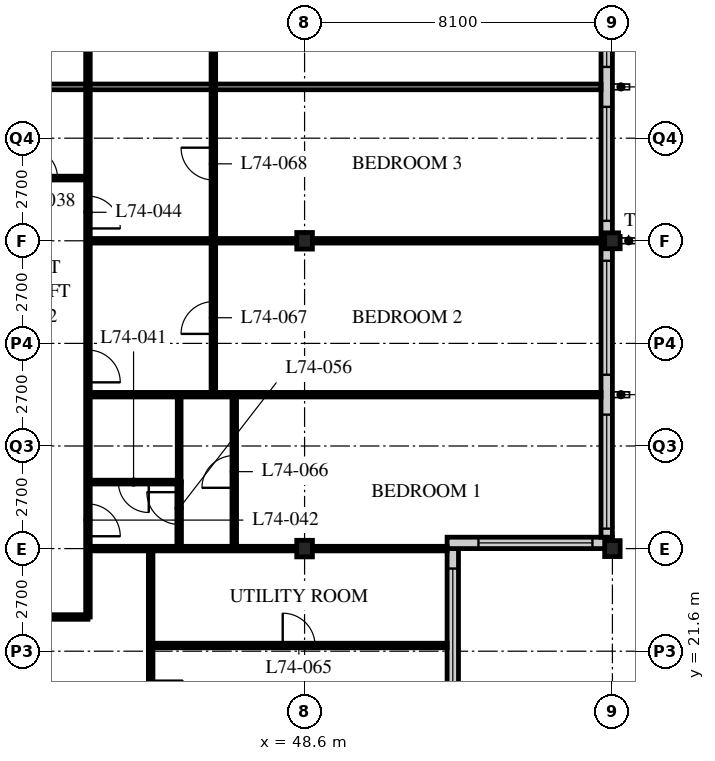
"""IFC4 building model, lengths in metres.
Left out: names, types, materials, properties, quantities, classifications, styles, units other than length and angle.
Written with IfcOpenShell. Run it as: python <this file> out.ifc"""

import sys

from ifc_helpers import new_model, si_unit, direction, frame, frame_2d, origin, origin_2d, place, context, subcontext, project, spatial, rectangle, i_section, extrude, element, fill, save


model = new_model("IFC4")
c1 = context("Model", 3, precision=1e-05, world=origin(), true_north=direction((0.0, 1.0)))
c2 = subcontext(c1, "Body", "Model", "MODEL_VIEW")
j1 = project(units=[si_unit("LENGTHUNIT", "METRE"), si_unit("PLANEANGLEUNIT", "RADIAN")], contexts=[c1])
p1 = place(None, origin())
s1 = spatial("IfcSite", under=j1, at=p1, CompositionType="ELEMENT")
p2 = place(p1, origin())
s2 = spatial("IfcBuilding", under=s1, at=p2, CompositionType="ELEMENT")
p3 = place(p2, frame((0.0, 0.0, 289.2)))
s3 = spatial("IfcBuildingStorey", under=s2, at=p3, CompositionType="ELEMENT", Elevation=289.2)
for number, where, z_axis, x_axis in (
    (1, (48.6, 24.3, 0.0), (0.0, 0.0, 1.0), (1.0, 0.0, 0.0)),
    (2, (48.6, 32.4, 0.0), (0.0, 0.0, 1.0), (1.0, 0.0, 0.0)),
):
    element("IfcColumn", number, at=place(p3, frame(where, z_axis=z_axis, x_axis=x_axis)), inside=s3, PredefinedType="COLUMN", context=c2, shape_type="SweptSolid", body=[
        extrude(i_section(OverallWidth=0.412, OverallDepth=0.437, WebThickness=0.036, FlangeThickness=0.058, FilletRadius=0.015, at=origin_2d()), origin(), (0.0, 0.0, 1.0), 3.9),
    ])
for number, where, z_axis, x_axis in (
    (3, (56.7, 24.3, 0.0), (0.0, 0.0, 1.0), (1.0, 0.0, 0.0)),
    (4, (56.7, 32.4, 0.0), (0.0, 0.0, 1.0), (1.0, 0.0, 0.0)),
):
    element("IfcColumn", number, at=place(p3, frame(where, z_axis=z_axis, x_axis=x_axis)), inside=s3, PredefinedType="COLUMN", context=c2, shape_type="SweptSolid", body=[
        extrude(i_section(OverallWidth=0.407, OverallDepth=0.419, WebThickness=0.031, FlangeThickness=0.049, FilletRadius=0.015, at=origin_2d()), origin(), (0.0, 0.0, 1.0), 3.9),
    ])
p4 = place(p3, frame((52.5, 20.55, 0.0), z_axis=(0.0, 0.0, 1.0), x_axis=(0.0, 1.0, 0.0)))
e5 = element("IfcWall", 5, at=p4, inside=s3, PredefinedType="SOLIDWALL", context=c2, shape_type="SweptSolid", body=[
    extrude(rectangle(XDim=3.75, YDim=0.3, at=frame_2d((1.875, 0.0))), origin(), (0.0, 0.0, 1.0), 3.69),
])
p5 = place(p4, frame((0.225, 0.0, 0.6)))
e6 = element("IfcOpeningElement", 6, at=p5, cuts=e5, PredefinedType="OPENING", context=c2, shape_type="SweptSolid", body=[
    extrude(rectangle(XDim=3.0, YDim=2.3, at=frame_2d((1.5, 1.15))), frame((0.0, 0.16, 0.0), z_axis=(0.0, -1.0, 0.0), x_axis=(1.0, 0.0, 0.0)), (0.0, 0.0, 1.0), 0.32),
])
p6 = place(p3, frame((52.35, 24.45, 0.0), z_axis=(0.0, 0.0, 1.0), x_axis=(1.0, 0.0, 0.0)))
e7 = element("IfcWall", 7, at=p6, inside=s3, PredefinedType="SOLIDWALL", context=c2, shape_type="SweptSolid", body=[
    extrude(rectangle(XDim=4.35, YDim=0.3, at=frame_2d((2.175, 0.0))), origin(), (0.0, 0.0, 1.0), 3.69),
])
p7 = place(p6, frame((0.825, 0.0, 0.6)))
e8 = element("IfcOpeningElement", 8, at=p7, cuts=e7, PredefinedType="OPENING", context=c2, shape_type="SweptSolid", body=[
    extrude(rectangle(XDim=3.0, YDim=2.3, at=frame_2d((1.5, 1.15))), frame((0.0, 0.16, 0.0), z_axis=(0.0, -1.0, 0.0), x_axis=(1.0, 0.0, 0.0)), (0.0, 0.0, 1.0), 0.32),
])
p8 = place(p3, frame((56.55, 24.6, 0.0), z_axis=(0.0, 0.0, 1.0), x_axis=(0.0, 1.0, 0.0)))
e9 = element("IfcWall", 9, at=p8, inside=s3, PredefinedType="SOLIDWALL", context=c2, shape_type="SweptSolid", body=[
    extrude(rectangle(XDim=32.1, YDim=0.3, at=frame_2d((16.05, 0.0))), origin(), (0.0, 0.0, 1.0), 3.69),
])
p9 = place(p8, frame((0.225, 0.0, 0.6)))
e10 = element("IfcOpeningElement", 10, at=p9, cuts=e9, PredefinedType="OPENING", context=c2, shape_type="SweptSolid", body=[
    extrude(rectangle(XDim=3.0, YDim=2.4, at=frame_2d((1.5, 1.2))), frame((0.0, 0.16, 0.0), z_axis=(0.0, -1.0, 0.0), x_axis=(1.0, 0.0, 0.0)), (0.0, 0.0, 1.0), 0.32),
])
p10 = place(p8, frame((4.275, 0.0, 0.6)))
e11 = element("IfcOpeningElement", 11, at=p10, cuts=e9, PredefinedType="OPENING", context=c2, shape_type="SweptSolid", body=[
    extrude(rectangle(XDim=3.0, YDim=2.4, at=frame_2d((1.5, 1.2))), frame((0.0, 0.16, 0.0), z_axis=(0.0, -1.0, 0.0), x_axis=(1.0, 0.0, 0.0)), (0.0, 0.0, 1.0), 0.32),
])
p11 = place(p8, frame((8.325, 0.0, 0.6)))
e12 = element("IfcOpeningElement", 12, at=p11, cuts=e9, PredefinedType="OPENING", context=c2, shape_type="SweptSolid", body=[
    extrude(rectangle(XDim=3.0, YDim=2.4, at=frame_2d((1.5, 1.2))), frame((0.0, 0.16, 0.0), z_axis=(0.0, -1.0, 0.0), x_axis=(1.0, 0.0, 0.0)), (0.0, 0.0, 1.0), 0.32),
])
p12 = place(p8, frame((12.375, 0.0, 0.6)))
e13 = element("IfcOpeningElement", 13, at=p12, cuts=e9, PredefinedType="OPENING", context=c2, shape_type="SweptSolid", body=[
    extrude(rectangle(XDim=3.0, YDim=2.4, at=frame_2d((1.5, 1.2))), frame((0.0, 0.16, 0.0), z_axis=(0.0, -1.0, 0.0), x_axis=(1.0, 0.0, 0.0)), (0.0, 0.0, 1.0), 0.32),
])
p13 = place(p8, frame((16.425, 0.0, 0.6)))
e14 = element("IfcOpeningElement", 14, at=p13, cuts=e9, PredefinedType="OPENING", context=c2, shape_type="SweptSolid", body=[
    extrude(rectangle(XDim=3.0, YDim=2.4, at=frame_2d((1.5, 1.2))), frame((0.0, 0.16, 0.0), z_axis=(0.0, -1.0, 0.0), x_axis=(1.0, 0.0, 0.0)), (0.0, 0.0, 1.0), 0.32),
])
p14 = place(p8, frame((20.475, 0.0, 0.6)))
e15 = element("IfcOpeningElement", 15, at=p14, cuts=e9, PredefinedType="OPENING", context=c2, shape_type="SweptSolid", body=[
    extrude(rectangle(XDim=3.0, YDim=2.4, at=frame_2d((1.5, 1.2))), frame((0.0, 0.16, 0.0), z_axis=(0.0, -1.0, 0.0), x_axis=(1.0, 0.0, 0.0)), (0.0, 0.0, 1.0), 0.32),
])
p15 = place(p8, frame((24.525, 0.0, 0.6)))
e16 = element("IfcOpeningElement", 16, at=p15, cuts=e9, PredefinedType="OPENING", context=c2, shape_type="SweptSolid", body=[
    extrude(rectangle(XDim=3.0, YDim=2.4, at=frame_2d((1.5, 1.2))), frame((0.0, 0.16, 0.0), z_axis=(0.0, -1.0, 0.0), x_axis=(1.0, 0.0, 0.0)), (0.0, 0.0, 1.0), 0.32),
])
p16 = place(p8, frame((28.575, 0.0, 0.6)))
e17 = element("IfcOpeningElement", 17, at=p16, cuts=e9, PredefinedType="OPENING", context=c2, shape_type="SweptSolid", body=[
    extrude(rectangle(XDim=3.0, YDim=2.4, at=frame_2d((1.5, 1.2))), frame((0.0, 0.16, 0.0), z_axis=(0.0, -1.0, 0.0), x_axis=(1.0, 0.0, 0.0)), (0.0, 0.0, 1.0), 0.32),
])
p17 = place(p3, frame((40.5, 34.05, 0.0), z_axis=(0.0, 0.0, 1.0), x_axis=(1.0, 0.0, 0.0)))
e18 = element("IfcWall", 18, at=p17, inside=s3, PredefinedType="PARTITIONING", context=c2, shape_type="SweptSolid", body=[
    extrude(rectangle(XDim=2.4, YDim=0.1, at=frame_2d((1.2, 0.0))), origin(), (0.0, 0.0, 1.0), 3.69),
])
p18 = place(p17, frame((0.8, 0.0, 0.0)))
e19 = element("IfcOpeningElement", 19, at=p18, cuts=e18, PredefinedType="OPENING", context=c2, shape_type="SweptSolid", body=[
    extrude(rectangle(XDim=0.8, YDim=2.1, at=frame_2d((0.4, 1.05))), frame((0.0, 0.06, 0.0), z_axis=(0.0, -1.0, 0.0), x_axis=(1.0, 0.0, 0.0)), (0.0, 0.0, 1.0), 0.12),
])
p19 = place(p3, frame((42.9, 22.5, 0.0), z_axis=(0.0, 0.0, 1.0), x_axis=(0.0, 1.0, 0.0)))
e20 = element("IfcWall", 20, at=p19, inside=s3, PredefinedType="PARTITIONING", context=c2, shape_type="SweptSolid", body=[
    extrude(rectangle(XDim=13.95, YDim=0.12, at=frame_2d((6.975, 0.0))), origin(), (0.0, 0.0, 1.0), 3.69),
])
p20 = place(p19, frame((2.125, 0.0, 0.0)))
e21 = element("IfcOpeningElement", 21, at=p20, cuts=e20, PredefinedType="OPENING", context=c2, shape_type="SweptSolid", body=[
    extrude(rectangle(XDim=0.85, YDim=2.1, at=frame_2d((0.425, 1.05))), frame((0.0, 0.07, 0.0), z_axis=(0.0, -1.0, 0.0), x_axis=(1.0, 0.0, 0.0)), (0.0, 0.0, 1.0), 0.14),
])
p21 = place(p19, frame((6.175, 0.0, 0.0)))
e22 = element("IfcOpeningElement", 22, at=p21, cuts=e20, PredefinedType="OPENING", context=c2, shape_type="SweptSolid", body=[
    extrude(rectangle(XDim=0.85, YDim=2.1, at=frame_2d((0.425, 1.05))), frame((0.0, 0.07, 0.0), z_axis=(0.0, -1.0, 0.0), x_axis=(1.0, 0.0, 0.0)), (0.0, 0.0, 1.0), 0.14),
])
p22 = place(p19, frame((10.225, 0.0, 0.0)))
e23 = element("IfcOpeningElement", 23, at=p22, cuts=e20, PredefinedType="OPENING", context=c2, shape_type="SweptSolid", body=[
    extrude(rectangle(XDim=0.85, YDim=2.1, at=frame_2d((0.425, 1.05))), frame((0.0, 0.07, 0.0), z_axis=(0.0, -1.0, 0.0), x_axis=(1.0, 0.0, 0.0)), (0.0, 0.0, 1.0), 0.14),
])
p23 = place(p3, frame((36.45, 22.5, 0.0), z_axis=(0.0, 0.0, 1.0), x_axis=(1.0, 0.0, 0.0)))
e24 = element("IfcWall", 24, at=p23, inside=s3, PredefinedType="PARTITIONING", context=c2, shape_type="SweptSolid", body=[
    extrude(rectangle(XDim=6.45, YDim=0.12, at=frame_2d((3.225, 0.0))), origin(), (0.0, 0.0, 1.0), 3.69),
])
p24 = place(p23, frame((2.8, 0.0, 0.0)))
e25 = element("IfcOpeningElement", 25, at=p24, cuts=e24, PredefinedType="OPENING", context=c2, shape_type="SweptSolid", body=[
    extrude(rectangle(XDim=0.85, YDim=2.1, at=frame_2d((0.425, 1.05))), frame((0.0, 0.07, 0.0), z_axis=(0.0, -1.0, 0.0), x_axis=(1.0, 0.0, 0.0)), (0.0, 0.0, 1.0), 0.14),
])
p25 = place(p3, frame((42.9, 24.3, 0.0), z_axis=(0.0, 0.0, 1.0), x_axis=(1.0, 0.0, 0.0)))
e26 = element("IfcWall", 26, at=p25, inside=s3, PredefinedType="PARTITIONING", context=c2, shape_type="SweptSolid", body=[
    extrude(rectangle(XDim=9.45, YDim=0.12, at=frame_2d((4.725, 0.0))), origin(), (0.0, 0.0, 1.0), 3.078),
])
p26 = place(p3, frame((40.5, 36.45, 0.0), z_axis=(0.0, 0.0, 1.0), x_axis=(1.0, 0.0, 0.0)))
e27 = element("IfcWall", 27, at=p26, inside=s3, PredefinedType="PARTITIONING", context=c2, shape_type="SweptSolid", body=[
    extrude(rectangle(XDim=15.9, YDim=0.15, at=frame_2d((7.95, 0.0))), origin(), (0.0, 0.0, 1.0), 3.69),
])
p27 = place(p3, frame((44.55, 16.5, 0.0), z_axis=(0.0, 0.0, 1.0), x_axis=(0.0, 1.0, 0.0)))
e28 = element("IfcWall", 28, at=p27, inside=s3, PredefinedType="PARTITIONING", context=c2, shape_type="SweptSolid", body=[
    extrude(rectangle(XDim=7.8, YDim=0.12, at=frame_2d((3.9, 0.0))), origin(), (0.0, 0.0, 1.0), 3.69),
])
p28 = place(p27, frame((3.475, 0.0, 0.0)))
e29 = element("IfcOpeningElement", 29, at=p28, cuts=e28, PredefinedType="OPENING", context=c2, shape_type="SweptSolid", body=[
    extrude(rectangle(XDim=0.85, YDim=2.1, at=frame_2d((0.425, 1.05))), frame((0.0, 0.07, 0.0), z_axis=(0.0, -1.0, 0.0), x_axis=(1.0, 0.0, 0.0)), (0.0, 0.0, 1.0), 0.14),
])
p29 = place(p3, frame((42.9, 26.05, 0.0), z_axis=(0.0, 0.0, 1.0), x_axis=(1.0, 0.0, 0.0)))
e30 = element("IfcWall", 30, at=p29, inside=s3, PredefinedType="PARTITIONING", context=c2, shape_type="SweptSolid", body=[
    extrude(rectangle(XDim=2.4, YDim=0.1, at=frame_2d((1.2, 0.0))), origin(), (0.0, 0.0, 1.0), 3.69),
])
p30 = place(p29, frame((0.8, 0.0, 0.0)))
e31 = element("IfcOpeningElement", 31, at=p30, cuts=e30, PredefinedType="OPENING", context=c2, shape_type="SweptSolid", body=[
    extrude(rectangle(XDim=0.8, YDim=2.1, at=frame_2d((0.4, 1.05))), frame((0.0, 0.06, 0.0), z_axis=(0.0, -1.0, 0.0), x_axis=(1.0, 0.0, 0.0)), (0.0, 0.0, 1.0), 0.12),
])
p31 = place(p3, frame((45.3, 26.05, 0.0), z_axis=(0.0, 0.0, 1.0), x_axis=(0.0, 1.0, 0.0)))
e32 = element("IfcWall", 32, at=p31, inside=s3, PredefinedType="PARTITIONING", context=c2, shape_type="SweptSolid", body=[
    extrude(rectangle(XDim=2.3, YDim=0.1, at=frame_2d((1.15, 0.0))), origin(), (0.0, 0.0, 1.0), 3.69),
])
p32 = place(p3, frame((42.9, 28.35, 0.0), z_axis=(0.0, 0.0, 1.0), x_axis=(1.0, 0.0, 0.0)))
e33 = element("IfcWall", 33, at=p32, inside=s3, PredefinedType="PARTITIONING", context=c2, shape_type="SweptSolid", body=[
    extrude(rectangle(XDim=13.5, YDim=0.12, at=frame_2d((6.75, 0.0))), origin(), (0.0, 0.0, 1.0), 3.69),
])
p33 = place(p3, frame((42.9, 32.4, 0.0), z_axis=(0.0, 0.0, 1.0), x_axis=(1.0, 0.0, 0.0)))
e34 = element("IfcWall", 34, at=p33, inside=s3, PredefinedType="PARTITIONING", context=c2, shape_type="SweptSolid", body=[
    extrude(rectangle(XDim=13.5, YDim=0.12, at=frame_2d((6.75, 0.0))), origin(), (0.0, 0.0, 1.0), 3.078),
])
p34 = place(p3, frame((42.9, 48.6, 0.0), z_axis=(0.0, 0.0, 1.0), x_axis=(0.0, -1.0, 0.0)))
e35 = element("IfcWall", 35, at=p34, inside=s3, PredefinedType="PARTITIONING", context=c2, shape_type="SweptSolid", body=[
    extrude(rectangle(XDim=12.15, YDim=0.12, at=frame_2d((6.075, 0.0))), origin(), (0.0, 0.0, 1.0), 3.69),
])
p35 = place(p34, frame((2.125, 0.0, 0.0)))
e36 = element("IfcOpeningElement", 36, at=p35, cuts=e35, PredefinedType="OPENING", context=c2, shape_type="SweptSolid", body=[
    extrude(rectangle(XDim=0.85, YDim=2.1, at=frame_2d((0.425, 1.05))), frame((0.0, 0.07, 0.0), z_axis=(0.0, -1.0, 0.0), x_axis=(1.0, 0.0, 0.0)), (0.0, 0.0, 1.0), 0.14),
])
p36 = place(p34, frame((8.425, 0.0, 0.0)))
e37 = element("IfcOpeningElement", 37, at=p36, cuts=e35, PredefinedType="OPENING", context=c2, shape_type="SweptSolid", body=[
    extrude(rectangle(XDim=0.85, YDim=2.1, at=frame_2d((0.425, 1.05))), frame((0.0, 0.07, 0.0), z_axis=(0.0, -1.0, 0.0), x_axis=(1.0, 0.0, 0.0)), (0.0, 0.0, 1.0), 0.14),
])
p37 = place(p3, frame((45.3, 24.3, 0.0), z_axis=(0.0, 0.0, 1.0), x_axis=(0.0, 1.0, 0.0)))
e38 = element("IfcWall", 38, at=p37, inside=s3, PredefinedType="PARTITIONING", context=c2, shape_type="SweptSolid", body=[
    extrude(rectangle(XDim=1.76, YDim=0.12, at=frame_2d((0.88, 0.0))), origin(), (0.0, 0.0, 1.0), 3.69),
])
p38 = place(p37, frame((0.635, 0.0, 0.0)))
e39 = element("IfcOpeningElement", 39, at=p38, cuts=e38, PredefinedType="OPENING", context=c2, shape_type="SweptSolid", body=[
    extrude(rectangle(XDim=0.85, YDim=2.1, at=frame_2d((0.425, 1.05))), frame((0.0, 0.07, 0.0), z_axis=(0.0, -1.0, 0.0), x_axis=(1.0, 0.0, 0.0)), (0.0, 0.0, 1.0), 0.14),
])
p39 = place(p3, frame((44.55, 21.75, 0.0), z_axis=(0.0, 0.0, 1.0), x_axis=(1.0, 0.0, 0.0)))
e40 = element("IfcWall", 40, at=p39, inside=s3, PredefinedType="PARTITIONING", context=c2, shape_type="SweptSolid", body=[
    extrude(rectangle(XDim=7.8, YDim=0.12, at=frame_2d((3.9, 0.0))), origin(), (0.0, 0.0, 1.0), 3.69),
])
p40 = place(p39, frame((3.475, 0.0, 0.0)))
e41 = element("IfcOpeningElement", 41, at=p40, cuts=e40, PredefinedType="OPENING", context=c2, shape_type="SweptSolid", body=[
    extrude(rectangle(XDim=0.85, YDim=2.1, at=frame_2d((0.425, 1.05))), frame((0.0, 0.07, 0.0), z_axis=(0.0, -1.0, 0.0), x_axis=(1.0, 0.0, 0.0)), (0.0, 0.0, 1.0), 0.14),
])
p41 = place(p3, frame((46.75, 24.3, 0.0), z_axis=(0.0, 0.0, 1.0), x_axis=(0.0, 1.0, 0.0)))
e42 = element("IfcWall", 42, at=p41, inside=s3, PredefinedType="PARTITIONING", context=c2, shape_type="SweptSolid", body=[
    extrude(rectangle(XDim=4.05, YDim=0.12, at=frame_2d((2.025, 0.0))), origin(), (0.0, 0.0, 1.0), 3.69),
])
p42 = place(p41, frame((1.6, 0.0, 0.0)))
e43 = element("IfcOpeningElement", 43, at=p42, cuts=e42, PredefinedType="OPENING", context=c2, shape_type="SweptSolid", body=[
    extrude(rectangle(XDim=0.85, YDim=2.1, at=frame_2d((0.425, 1.05))), frame((0.0, 0.07, 0.0), z_axis=(0.0, -1.0, 0.0), x_axis=(1.0, 0.0, 0.0)), (0.0, 0.0, 1.0), 0.14),
])
p43 = place(p3, frame((46.2, 28.35, 0.0), z_axis=(0.0, 0.0, 1.0), x_axis=(0.0, 1.0, 0.0)))
e44 = element("IfcWall", 44, at=p43, inside=s3, PredefinedType="PARTITIONING", context=c2, shape_type="SweptSolid", body=[
    extrude(rectangle(XDim=12.15, YDim=0.12, at=frame_2d((6.075, 0.0))), origin(), (0.0, 0.0, 1.0), 3.69),
])
p44 = place(p43, frame((1.6, 0.0, 0.0)))
e45 = element("IfcOpeningElement", 45, at=p44, cuts=e44, PredefinedType="OPENING", context=c2, shape_type="SweptSolid", body=[
    extrude(rectangle(XDim=0.85, YDim=2.1, at=frame_2d((0.425, 1.05))), frame((0.0, 0.07, 0.0), z_axis=(0.0, -1.0, 0.0), x_axis=(1.0, 0.0, 0.0)), (0.0, 0.0, 1.0), 0.14),
])
p45 = place(p43, frame((5.65, 0.0, 0.0)))
e46 = element("IfcOpeningElement", 46, at=p45, cuts=e44, PredefinedType="OPENING", context=c2, shape_type="SweptSolid", body=[
    extrude(rectangle(XDim=0.85, YDim=2.1, at=frame_2d((0.425, 1.05))), frame((0.0, 0.07, 0.0), z_axis=(0.0, -1.0, 0.0), x_axis=(1.0, 0.0, 0.0)), (0.0, 0.0, 1.0), 0.14),
])
p46 = place(p43, frame((9.7, 0.0, 0.0)))
e47 = element("IfcOpeningElement", 47, at=p46, cuts=e44, PredefinedType="OPENING", context=c2, shape_type="SweptSolid", body=[
    extrude(rectangle(XDim=0.85, YDim=2.1, at=frame_2d((0.425, 1.05))), frame((0.0, 0.07, 0.0), z_axis=(0.0, -1.0, 0.0), x_axis=(1.0, 0.0, 0.0)), (0.0, 0.0, 1.0), 0.14),
])
p47 = place(p5, origin())
e48 = element("IfcWindow", 48, at=p47, inside=s3, PartitioningType="SINGLE_PANEL", PredefinedType="WINDOW", context=c2, shape_type="SweptSolid", body=[
    extrude(rectangle(XDim=3.0, YDim=2.3, at=frame_2d((1.5, 1.15))), frame((0.0, 0.03, 0.0), z_axis=(0.0, -1.0, 0.0), x_axis=(1.0, 0.0, 0.0)), (0.0, 0.0, 1.0), 0.06),
])
fill(e6, e48)
p48 = place(p7, origin())
e49 = element("IfcWindow", 49, at=p48, inside=s3, PartitioningType="SINGLE_PANEL", PredefinedType="WINDOW", context=c2, shape_type="SweptSolid", body=[
    extrude(rectangle(XDim=3.0, YDim=2.3, at=frame_2d((1.5, 1.15))), frame((0.0, 0.03, 0.0), z_axis=(0.0, -1.0, 0.0), x_axis=(1.0, 0.0, 0.0)), (0.0, 0.0, 1.0), 0.06),
])
fill(e8, e49)
p49 = place(p9, origin())
e50 = element("IfcWindow", 50, at=p49, inside=s3, PartitioningType="SINGLE_PANEL", PredefinedType="WINDOW", context=c2, shape_type="SweptSolid", body=[
    extrude(rectangle(XDim=3.0, YDim=2.4, at=frame_2d((1.5, 1.2))), frame((0.0, 0.03, 0.0), z_axis=(0.0, -1.0, 0.0), x_axis=(1.0, 0.0, 0.0)), (0.0, 0.0, 1.0), 0.06),
])
fill(e10, e50)
p50 = place(p10, origin())
e51 = element("IfcWindow", 51, at=p50, inside=s3, PartitioningType="SINGLE_PANEL", PredefinedType="WINDOW", context=c2, shape_type="SweptSolid", body=[
    extrude(rectangle(XDim=3.0, YDim=2.4, at=frame_2d((1.5, 1.2))), frame((0.0, 0.03, 0.0), z_axis=(0.0, -1.0, 0.0), x_axis=(1.0, 0.0, 0.0)), (0.0, 0.0, 1.0), 0.06),
])
fill(e11, e51)
p51 = place(p11, origin())
e52 = element("IfcWindow", 52, at=p51, inside=s3, PartitioningType="SINGLE_PANEL", PredefinedType="WINDOW", context=c2, shape_type="SweptSolid", body=[
    extrude(rectangle(XDim=3.0, YDim=2.4, at=frame_2d((1.5, 1.2))), frame((0.0, 0.03, 0.0), z_axis=(0.0, -1.0, 0.0), x_axis=(1.0, 0.0, 0.0)), (0.0, 0.0, 1.0), 0.06),
])
fill(e12, e52)
p52 = place(p12, origin())
e53 = element("IfcWindow", 53, at=p52, inside=s3, PartitioningType="SINGLE_PANEL", PredefinedType="WINDOW", context=c2, shape_type="SweptSolid", body=[
    extrude(rectangle(XDim=3.0, YDim=2.4, at=frame_2d((1.5, 1.2))), frame((0.0, 0.03, 0.0), z_axis=(0.0, -1.0, 0.0), x_axis=(1.0, 0.0, 0.0)), (0.0, 0.0, 1.0), 0.06),
])
fill(e13, e53)
p53 = place(p18, origin())
e54 = element("IfcDoor", 54, at=p53, inside=s3, OperationType="SINGLE_SWING_LEFT", PredefinedType="DOOR", context=c2, shape_type="SweptSolid", body=[
    extrude(rectangle(XDim=0.8, YDim=2.1, at=frame_2d((0.4, 1.05))), frame((0.0, 0.025, 0.0), z_axis=(0.0, -1.0, 0.0), x_axis=(1.0, 0.0, 0.0)), (0.0, 0.0, 1.0), 0.05),
])
fill(e19, e54)
p54 = place(p28, origin())
e55 = element("IfcDoor", 55, at=p54, inside=s3, OperationType="SINGLE_SWING_LEFT", PredefinedType="DOOR", context=c2, shape_type="SweptSolid", body=[
    extrude(rectangle(XDim=0.85, YDim=2.1, at=frame_2d((0.425, 1.05))), frame((0.0, 0.025, 0.0), z_axis=(0.0, -1.0, 0.0), x_axis=(1.0, 0.0, 0.0)), (0.0, 0.0, 1.0), 0.05),
])
fill(e29, e55)
p55 = place(p30, origin())
e56 = element("IfcDoor", 56, at=p55, inside=s3, OperationType="SINGLE_SWING_LEFT", PredefinedType="DOOR", context=c2, shape_type="SweptSolid", body=[
    extrude(rectangle(XDim=0.8, YDim=2.1, at=frame_2d((0.4, 1.05))), frame((0.0, 0.025, 0.0), z_axis=(0.0, -1.0, 0.0), x_axis=(1.0, 0.0, 0.0)), (0.0, 0.0, 1.0), 0.05),
])
fill(e31, e56)
p56 = place(p20, origin())
e57 = element("IfcDoor", 57, at=p56, inside=s3, OperationType="SINGLE_SWING_RIGHT", PredefinedType="DOOR", context=c2, shape_type="SweptSolid", body=[
    extrude(rectangle(XDim=0.85, YDim=2.1, at=frame_2d((0.425, 1.05))), frame((0.0, 0.025, 0.0), z_axis=(0.0, -1.0, 0.0), x_axis=(1.0, 0.0, 0.0)), (0.0, 0.0, 1.0), 0.05),
])
fill(e21, e57)
p57 = place(p21, origin())
e58 = element("IfcDoor", 58, at=p57, inside=s3, OperationType="SINGLE_SWING_RIGHT", PredefinedType="DOOR", context=c2, shape_type="SweptSolid", body=[
    extrude(rectangle(XDim=0.85, YDim=2.1, at=frame_2d((0.425, 1.05))), frame((0.0, 0.025, 0.0), z_axis=(0.0, -1.0, 0.0), x_axis=(1.0, 0.0, 0.0)), (0.0, 0.0, 1.0), 0.05),
])
fill(e22, e58)
p58 = place(p22, origin())
e59 = element("IfcDoor", 59, at=p58, inside=s3, OperationType="SINGLE_SWING_RIGHT", PredefinedType="DOOR", context=c2, shape_type="SweptSolid", body=[
    extrude(rectangle(XDim=0.85, YDim=2.1, at=frame_2d((0.425, 1.05))), frame((0.0, 0.025, 0.0), z_axis=(0.0, -1.0, 0.0), x_axis=(1.0, 0.0, 0.0)), (0.0, 0.0, 1.0), 0.05),
])
fill(e23, e59)
p59 = place(p38, origin())
e60 = element("IfcDoor", 60, at=p59, inside=s3, OperationType="SINGLE_SWING_RIGHT", PredefinedType="DOOR", context=c2, shape_type="SweptSolid", body=[
    extrude(rectangle(XDim=0.85, YDim=2.1, at=frame_2d((0.425, 1.05))), frame((0.0, 0.025, 0.0), z_axis=(0.0, -1.0, 0.0), x_axis=(1.0, 0.0, 0.0)), (0.0, 0.0, 1.0), 0.05),
])
fill(e39, e60)
p60 = place(p40, origin())
e61 = element("IfcDoor", 61, at=p60, inside=s3, OperationType="SINGLE_SWING_LEFT", PredefinedType="DOOR", context=c2, shape_type="SweptSolid", body=[
    extrude(rectangle(XDim=0.85, YDim=2.1, at=frame_2d((0.425, 1.05))), frame((0.0, 0.025, 0.0), z_axis=(0.0, -1.0, 0.0), x_axis=(1.0, 0.0, 0.0)), (0.0, 0.0, 1.0), 0.05),
])
fill(e41, e61)
p61 = place(p42, origin())
e62 = element("IfcDoor", 62, at=p61, inside=s3, OperationType="SINGLE_SWING_LEFT", PredefinedType="DOOR", context=c2, shape_type="SweptSolid", body=[
    extrude(rectangle(XDim=0.85, YDim=2.1, at=frame_2d((0.425, 1.05))), frame((0.0, 0.025, 0.0), z_axis=(0.0, -1.0, 0.0), x_axis=(1.0, 0.0, 0.0)), (0.0, 0.0, 1.0), 0.05),
])
fill(e43, e62)
p62 = place(p44, origin())
e63 = element("IfcDoor", 63, at=p62, inside=s3, OperationType="SINGLE_SWING_LEFT", PredefinedType="DOOR", context=c2, shape_type="SweptSolid", body=[
    extrude(rectangle(XDim=0.85, YDim=2.1, at=frame_2d((0.425, 1.05))), frame((0.0, 0.025, 0.0), z_axis=(0.0, -1.0, 0.0), x_axis=(1.0, 0.0, 0.0)), (0.0, 0.0, 1.0), 0.05),
])
fill(e45, e63)
p63 = place(p45, origin())
e64 = element("IfcDoor", 64, at=p63, inside=s3, OperationType="SINGLE_SWING_RIGHT", PredefinedType="DOOR", context=c2, shape_type="SweptSolid", body=[
    extrude(rectangle(XDim=0.85, YDim=2.1, at=frame_2d((0.425, 1.05))), frame((0.0, 0.025, 0.0), z_axis=(0.0, -1.0, 0.0), x_axis=(1.0, 0.0, 0.0)), (0.0, 0.0, 1.0), 0.05),
])
fill(e46, e64)
save(model, sys.argv[1])
